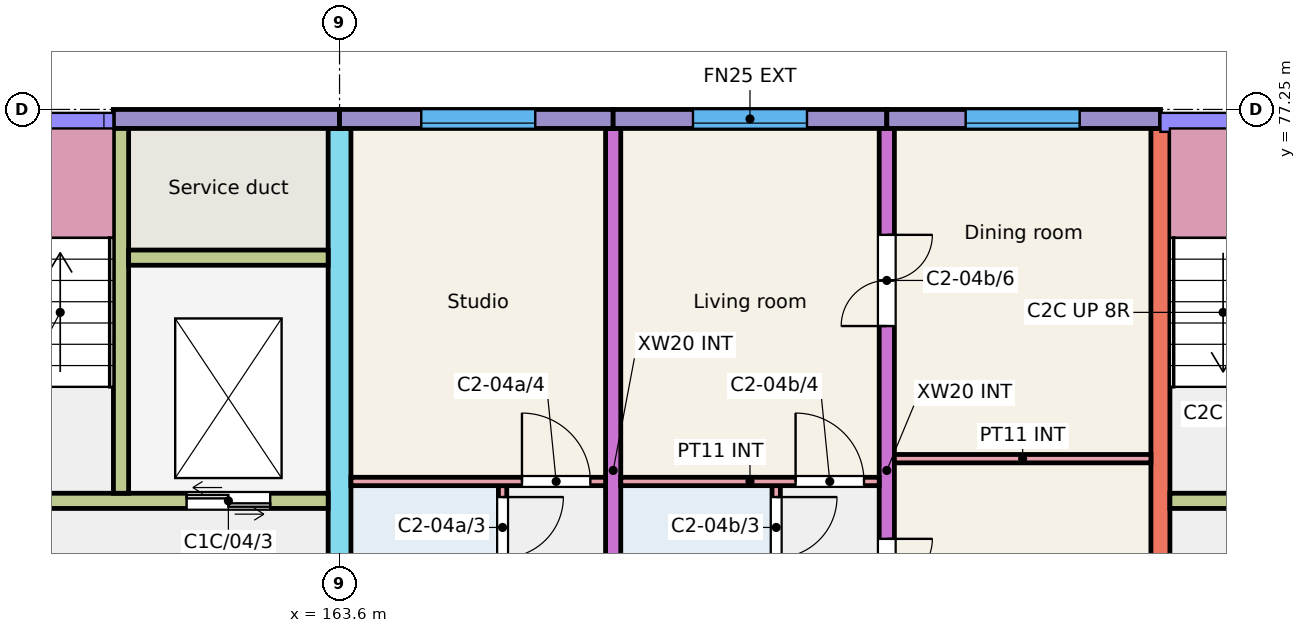
"""IFC4 building model, lengths in metres.
Left out: names, types, materials, properties, quantities, classifications, styles, units other than length and angle.
Written with IfcOpenShell. Run it as: python <this file> out.ifc"""

import sys

from ifc_helpers import new_model, si_unit, direction, frame, frame_2d, origin, place, context, subcontext, project, spatial, rectangle, extrude, element, fill, save


model = new_model("IFC4")
c1 = context("Model", 3, precision=1e-05, world=origin(), true_north=direction((0.0, 1.0)))
c2 = subcontext(c1, "Body", "Model", "MODEL_VIEW")
j1 = project(units=[si_unit("LENGTHUNIT", "METRE"), si_unit("PLANEANGLEUNIT", "RADIAN")], contexts=[c1])
p1 = place(None, origin())
s1 = spatial("IfcSite", under=j1, at=p1, CompositionType="ELEMENT")
p2 = place(p1, origin())
s2 = spatial("IfcBuilding", under=s1, at=p2, CompositionType="ELEMENT")
p3 = place(p2, frame((0.0, 0.0, 12.0)))
s3 = spatial("IfcBuildingStorey", under=s2, at=p3, CompositionType="ELEMENT", Elevation=12.0)
p4 = place(p3, frame((163.6, 66.0, 0.0), z_axis=(0.0, 0.0, 1.0), x_axis=(0.0, 1.0, 0.0)))
e1 = element("IfcWall", 1, at=p4, inside=s3, PredefinedType="SHEAR", context=c2, shape_type="SweptSolid", body=[
    extrude(rectangle(XDim=11.0, YDim=0.3, at=frame_2d((5.5, 0.0))), origin(), (0.0, 0.0, 1.0), 3.0),
])
p5 = place(p4, frame((0.3, 0.0, 0.0)))
e2 = element("IfcOpeningElement", 2, at=p5, cuts=e1, PredefinedType="OPENING", context=c2, shape_type="SweptSolid", body=[
    extrude(rectangle(XDim=1.2, YDim=2.1, at=frame_2d((0.6, 1.05))), frame((0.0, 0.16, 0.0), z_axis=(0.0, -1.0, 0.0), x_axis=(1.0, 0.0, 0.0)), (0.0, 0.0, 1.0), 0.32),
])
p6 = place(p3, frame((167.2, 68.0, 0.0), z_axis=(0.0, 0.0, 1.0), x_axis=(0.0, 1.0, 0.0)))
e3 = element("IfcWall", 3, at=p6, inside=s3, PredefinedType="SHEAR", context=c2, shape_type="SweptSolid", body=[
    extrude(rectangle(XDim=9.0, YDim=0.2, at=frame_2d((4.5, 0.0))), origin(), (0.0, 0.0, 1.0), 3.0),
])
p7 = place(p3, frame((170.8, 68.0, 0.0), z_axis=(0.0, 0.0, 1.0), x_axis=(0.0, 1.0, 0.0)))
e4 = element("IfcWall", 4, at=p7, inside=s3, PredefinedType="SHEAR", context=c2, shape_type="SweptSolid", body=[
    extrude(rectangle(XDim=9.0, YDim=0.2, at=frame_2d((4.5, 0.0))), origin(), (0.0, 0.0, 1.0), 3.0),
])
p8 = place(p7, frame((2.4, 0.0, 0.0)))
e5 = element("IfcOpeningElement", 5, at=p8, cuts=e4, PredefinedType="OPENING", context=c2, shape_type="SweptSolid", body=[
    extrude(rectangle(XDim=1.2, YDim=2.1, at=frame_2d((0.6, 1.05))), frame((0.0, 0.11, 0.0), z_axis=(0.0, -1.0, 0.0), x_axis=(1.0, 0.0, 0.0)), (0.0, 0.0, 1.0), 0.22),
])
p9 = place(p7, frame((6.4, 0.0, 0.0)))
e6 = element("IfcOpeningElement", 6, at=p9, cuts=e4, PredefinedType="OPENING", context=c2, shape_type="SweptSolid", body=[
    extrude(rectangle(XDim=1.2, YDim=2.1, at=frame_2d((0.6, 1.05))), frame((0.0, 0.11, 0.0), z_axis=(0.0, -1.0, 0.0), x_axis=(1.0, 0.0, 0.0)), (0.0, 0.0, 1.0), 0.22),
])
p10 = place(p3, frame((174.4, 68.0, 0.0), z_axis=(0.0, 0.0, 1.0), x_axis=(0.0, 1.0, 0.0)))
e7 = element("IfcWall", 7, at=p10, inside=s3, PredefinedType="SHEAR", context=c2, shape_type="SweptSolid", body=[
    extrude(rectangle(XDim=9.0, YDim=0.25, at=frame_2d((4.5, 0.0))), origin(), (0.0, 0.0, 1.0), 3.0),
])
p11 = place(p3, frame((160.625, 77.125, 0.0), z_axis=(0.0, 0.0, 1.0), x_axis=(1.0, 0.0, 0.0)))
e8 = element("IfcWall", 8, at=p11, inside=s3, PredefinedType="SOLIDWALL", context=c2, shape_type="SweptSolid", body=[
    extrude(rectangle(XDim=2.975, YDim=0.25, at=frame_2d((1.488, 0.0))), origin(), (0.0, 0.0, 1.0), 3.0),
])
p12 = place(p3, frame((157.725, 72.1, 0.0), z_axis=(0.0, 0.0, 1.0), x_axis=(1.0, 0.0, 0.0)))
e9 = element("IfcWall", 9, at=p12, inside=s3, PredefinedType="SHEAR", context=c2, shape_type="SweptSolid", body=[
    extrude(rectangle(XDim=5.725, YDim=0.2, at=frame_2d((2.862, 0.0))), origin(), (0.0, 0.0, 1.0), 3.0),
])
p13 = place(p12, frame((0.95, 0.0, 0.0)))
e10 = element("IfcOpeningElement", 10, at=p13, cuts=e9, PredefinedType="OPENING", context=c2, shape_type="SweptSolid", body=[
    extrude(rectangle(XDim=1.0, YDim=2.1, at=frame_2d((0.5, 1.05))), frame((0.0, 0.11, 0.0), z_axis=(0.0, -1.0, 0.0), x_axis=(1.0, 0.0, 0.0)), (0.0, 0.0, 1.0), 0.22),
])
p14 = place(p12, frame((3.863, 0.0, 0.0)))
e11 = element("IfcOpeningElement", 11, at=p14, cuts=e9, PredefinedType="OPENING", context=c2, shape_type="SweptSolid", body=[
    extrude(rectangle(XDim=1.1, YDim=2.1, at=frame_2d((0.55, 1.05))), frame((0.0, 0.11, 0.0), z_axis=(0.0, -1.0, 0.0), x_axis=(1.0, 0.0, 0.0)), (0.0, 0.0, 1.0), 0.22),
])
p15 = place(p3, frame((160.725, 72.2, 0.0), z_axis=(0.0, 0.0, 1.0), x_axis=(0.0, 1.0, 0.0)))
e12 = element("IfcWall", 12, at=p15, inside=s3, PredefinedType="SHEAR", context=c2, shape_type="SweptSolid", body=[
    extrude(rectangle(XDim=4.8, YDim=0.2, at=frame_2d((2.4, 0.0))), origin(), (0.0, 0.0, 1.0), 3.0),
])
p16 = place(p3, frame((160.825, 75.3, 0.0), z_axis=(0.0, 0.0, 1.0), x_axis=(1.0, 0.0, 0.0)))
e13 = element("IfcWall", 13, at=p16, inside=s3, PredefinedType="SHEAR", context=c2, shape_type="SweptSolid", body=[
    extrude(rectangle(XDim=2.625, YDim=0.2, at=frame_2d((1.312, 0.0))), origin(), (0.0, 0.0, 1.0), 3.0),
])
p17 = place(p3, frame((163.6, 77.125, 0.0), z_axis=(0.0, 0.0, 1.0), x_axis=(1.0, 0.0, 0.0)))
e14 = element("IfcWall", 14, at=p17, inside=s3, PredefinedType="SOLIDWALL", context=c2, shape_type="SweptSolid", body=[
    extrude(rectangle(XDim=3.6, YDim=0.25, at=frame_2d((1.8, 0.0))), origin(), (0.0, 0.0, 1.0), 3.0),
])
p18 = place(p17, frame((1.075, 0.0, 0.9)))
e15 = element("IfcOpeningElement", 15, at=p18, cuts=e14, PredefinedType="OPENING", context=c2, shape_type="SweptSolid", body=[
    extrude(rectangle(XDim=1.5, YDim=1.5, at=frame_2d((0.75, 0.75))), frame((0.0, 0.135, 0.0), z_axis=(0.0, -1.0, 0.0), x_axis=(1.0, 0.0, 0.0)), (0.0, 0.0, 1.0), 0.27),
])
p19 = place(p3, frame((167.2, 77.125, 0.0), z_axis=(0.0, 0.0, 1.0), x_axis=(1.0, 0.0, 0.0)))
e16 = element("IfcWall", 16, at=p19, inside=s3, PredefinedType="SOLIDWALL", context=c2, shape_type="SweptSolid", body=[
    extrude(rectangle(XDim=3.6, YDim=0.25, at=frame_2d((1.8, 0.0))), origin(), (0.0, 0.0, 1.0), 3.0),
])
p20 = place(p19, frame((1.05, 0.0, 0.9)))
e17 = element("IfcOpeningElement", 17, at=p20, cuts=e16, PredefinedType="OPENING", context=c2, shape_type="SweptSolid", body=[
    extrude(rectangle(XDim=1.5, YDim=1.5, at=frame_2d((0.75, 0.75))), frame((0.0, 0.135, 0.0), z_axis=(0.0, -1.0, 0.0), x_axis=(1.0, 0.0, 0.0)), (0.0, 0.0, 1.0), 0.27),
])
p21 = place(p3, frame((170.8, 77.125, 0.0), z_axis=(0.0, 0.0, 1.0), x_axis=(1.0, 0.0, 0.0)))
e18 = element("IfcWall", 18, at=p21, inside=s3, PredefinedType="SOLIDWALL", context=c2, shape_type="SweptSolid", body=[
    extrude(rectangle(XDim=3.6, YDim=0.25, at=frame_2d((1.8, 0.0))), origin(), (0.0, 0.0, 1.0), 3.0),
])
p22 = place(p21, frame((1.038, 0.0, 0.9)))
e19 = element("IfcOpeningElement", 19, at=p22, cuts=e18, PredefinedType="OPENING", context=c2, shape_type="SweptSolid", body=[
    extrude(rectangle(XDim=1.5, YDim=1.5, at=frame_2d((0.75, 0.75))), frame((0.0, 0.135, 0.0), z_axis=(0.0, -1.0, 0.0), x_axis=(1.0, 0.0, 0.0)), (0.0, 0.0, 1.0), 0.27),
])
p23 = place(p3, frame((174.525, 72.1, 0.0), z_axis=(0.0, 0.0, 1.0), x_axis=(1.0, 0.0, 0.0)))
e20 = element("IfcWall", 20, at=p23, inside=s3, PredefinedType="SHEAR", context=c2, shape_type="SweptSolid", body=[
    extrude(rectangle(XDim=5.725, YDim=0.2, at=frame_2d((2.863, 0.0))), origin(), (0.0, 0.0, 1.0), 3.0),
])
p24 = place(p23, frame((0.95, 0.0, 0.0)))
e21 = element("IfcOpeningElement", 21, at=p24, cuts=e20, PredefinedType="OPENING", context=c2, shape_type="SweptSolid", body=[
    extrude(rectangle(XDim=1.0, YDim=2.1, at=frame_2d((0.5, 1.05))), frame((0.0, 0.11, 0.0), z_axis=(0.0, -1.0, 0.0), x_axis=(1.0, 0.0, 0.0)), (0.0, 0.0, 1.0), 0.22),
])
p25 = place(p23, frame((3.863, 0.0, 0.0)))
e22 = element("IfcOpeningElement", 22, at=p25, cuts=e20, PredefinedType="OPENING", context=c2, shape_type="SweptSolid", body=[
    extrude(rectangle(XDim=1.1, YDim=2.1, at=frame_2d((0.55, 1.05))), frame((0.0, 0.11, 0.0), z_axis=(0.0, -1.0, 0.0), x_axis=(1.0, 0.0, 0.0)), (0.0, 0.0, 1.0), 0.22),
])
p26 = place(p3, frame((165.745, 68.0, 0.0), z_axis=(0.0, 0.0, 1.0), x_axis=(0.0, 1.0, 0.0)))
e23 = element("IfcWall", 23, at=p26, inside=s3, PredefinedType="PARTITIONING", context=c2, shape_type="SweptSolid", body=[
    extrude(rectangle(XDim=4.3, YDim=0.11, at=frame_2d((2.15, 0.0))), origin(), (0.0, 0.0, 1.0), 2.8),
])
p27 = place(p26, frame((0.2, 0.0, 0.0)))
e24 = element("IfcOpeningElement", 24, at=p27, cuts=e23, PredefinedType="OPENING", context=c2, shape_type="SweptSolid", body=[
    extrude(rectangle(XDim=0.8, YDim=2.1, at=frame_2d((0.4, 1.05))), frame((0.0, 0.065, 0.0), z_axis=(0.0, -1.0, 0.0), x_axis=(1.0, 0.0, 0.0)), (0.0, 0.0, 1.0), 0.13),
])
p28 = place(p26, frame((3.35, 0.0, 0.0)))
e25 = element("IfcOpeningElement", 25, at=p28, cuts=e23, PredefinedType="OPENING", context=c2, shape_type="SweptSolid", body=[
    extrude(rectangle(XDim=0.8, YDim=2.1, at=frame_2d((0.4, 1.05))), frame((0.0, 0.065, 0.0), z_axis=(0.0, -1.0, 0.0), x_axis=(1.0, 0.0, 0.0)), (0.0, 0.0, 1.0), 0.13),
])
p29 = place(p3, frame((163.75, 72.355, 0.0), z_axis=(0.0, 0.0, 1.0), x_axis=(1.0, 0.0, 0.0)))
e26 = element("IfcWall", 26, at=p29, inside=s3, PredefinedType="PARTITIONING", context=c2, shape_type="SweptSolid", body=[
    extrude(rectangle(XDim=3.35, YDim=0.11, at=frame_2d((1.675, 0.0))), origin(), (0.0, 0.0, 1.0), 2.8),
])
p30 = place(p29, frame((2.25, 0.0, 0.0)))
e27 = element("IfcOpeningElement", 27, at=p30, cuts=e26, PredefinedType="OPENING", context=c2, shape_type="SweptSolid", body=[
    extrude(rectangle(XDim=0.9, YDim=2.1, at=frame_2d((0.45, 1.05))), frame((0.0, 0.065, 0.0), z_axis=(0.0, -1.0, 0.0), x_axis=(1.0, 0.0, 0.0)), (0.0, 0.0, 1.0), 0.13),
])
p31 = place(p3, frame((169.345, 68.0, 0.0), z_axis=(0.0, 0.0, 1.0), x_axis=(0.0, 1.0, 0.0)))
e28 = element("IfcWall", 28, at=p31, inside=s3, PredefinedType="PARTITIONING", context=c2, shape_type="SweptSolid", body=[
    extrude(rectangle(XDim=4.3, YDim=0.11, at=frame_2d((2.15, 0.0))), origin(), (0.0, 0.0, 1.0), 2.8),
])
p32 = place(p31, frame((0.2, 0.0, 0.0)))
e29 = element("IfcOpeningElement", 29, at=p32, cuts=e28, PredefinedType="OPENING", context=c2, shape_type="SweptSolid", body=[
    extrude(rectangle(XDim=0.8, YDim=2.1, at=frame_2d((0.4, 1.05))), frame((0.0, 0.065, 0.0), z_axis=(0.0, -1.0, 0.0), x_axis=(1.0, 0.0, 0.0)), (0.0, 0.0, 1.0), 0.13),
])
p33 = place(p31, frame((3.35, 0.0, 0.0)))
e30 = element("IfcOpeningElement", 30, at=p33, cuts=e28, PredefinedType="OPENING", context=c2, shape_type="SweptSolid", body=[
    extrude(rectangle(XDim=0.8, YDim=2.1, at=frame_2d((0.4, 1.05))), frame((0.0, 0.065, 0.0), z_axis=(0.0, -1.0, 0.0), x_axis=(1.0, 0.0, 0.0)), (0.0, 0.0, 1.0), 0.13),
])
p34 = place(p3, frame((167.3, 72.355, 0.0), z_axis=(0.0, 0.0, 1.0), x_axis=(1.0, 0.0, 0.0)))
e31 = element("IfcWall", 31, at=p34, inside=s3, PredefinedType="PARTITIONING", context=c2, shape_type="SweptSolid", body=[
    extrude(rectangle(XDim=3.4, YDim=0.11, at=frame_2d((1.7, 0.0))), origin(), (0.0, 0.0, 1.0), 2.8),
])
p35 = place(p34, frame((2.3, 0.0, 0.0)))
e32 = element("IfcOpeningElement", 32, at=p35, cuts=e31, PredefinedType="OPENING", context=c2, shape_type="SweptSolid", body=[
    extrude(rectangle(XDim=0.9, YDim=2.1, at=frame_2d((0.45, 1.05))), frame((0.0, 0.065, 0.0), z_axis=(0.0, -1.0, 0.0), x_axis=(1.0, 0.0, 0.0)), (0.0, 0.0, 1.0), 0.13),
])
p36 = place(p3, frame((170.9, 72.655, 0.0), z_axis=(0.0, 0.0, 1.0), x_axis=(1.0, 0.0, 0.0)))
e33 = element("IfcWall", 33, at=p36, inside=s3, PredefinedType="PARTITIONING", context=c2, shape_type="SweptSolid", body=[
    extrude(rectangle(XDim=3.375, YDim=0.11, at=frame_2d((1.688, 0.0))), origin(), (0.0, 0.0, 1.0), 2.8),
])
p37 = place(p18, origin())
e34 = element("IfcWindow", 34, at=p37, inside=s3, PartitioningType="SINGLE_PANEL", PredefinedType="WINDOW", context=c2, shape_type="SweptSolid", body=[
    extrude(rectangle(XDim=1.5, YDim=1.5, at=frame_2d((0.75, 0.75))), frame((0.0, -0.025, 0.0), z_axis=(0.0, -1.0, 0.0), x_axis=(1.0, 0.0, 0.0)), (0.0, 0.0, 1.0), 0.06),
])
fill(e15, e34)
p38 = place(p22, origin())
e35 = element("IfcWindow", 35, at=p38, inside=s3, PartitioningType="SINGLE_PANEL", PredefinedType="WINDOW", context=c2, shape_type="SweptSolid", body=[
    extrude(rectangle(XDim=1.5, YDim=1.5, at=frame_2d((0.75, 0.75))), frame((0.0, -0.025, 0.0), z_axis=(0.0, -1.0, 0.0), x_axis=(1.0, 0.0, 0.0)), (0.0, 0.0, 1.0), 0.06),
])
fill(e19, e35)
p39 = place(p20, origin())
e36 = element("IfcWindow", 36, at=p39, inside=s3, PartitioningType="SINGLE_PANEL", PredefinedType="WINDOW", context=c2, shape_type="SweptSolid", body=[
    extrude(rectangle(XDim=1.5, YDim=1.5, at=frame_2d((0.75, 0.75))), frame((0.0, -0.025, 0.0), z_axis=(0.0, -1.0, 0.0), x_axis=(1.0, 0.0, 0.0)), (0.0, 0.0, 1.0), 0.06),
])
fill(e17, e36)
p40 = place(p28, origin())
e37 = element("IfcDoor", 37, at=p40, inside=s3, OperationType="SINGLE_SWING_RIGHT", PredefinedType="DOOR", context=c2, shape_type="SweptSolid", body=[
    extrude(rectangle(XDim=0.8, YDim=2.1, at=frame_2d((0.4, 1.05))), frame((0.0, 0.025, 0.0), z_axis=(0.0, -1.0, 0.0), x_axis=(1.0, 0.0, 0.0)), (0.0, 0.0, 1.0), 0.05),
])
fill(e25, e37)
p41 = place(p30, origin())
e38 = element("IfcDoor", 38, at=p41, inside=s3, OperationType="SINGLE_SWING_LEFT", PredefinedType="DOOR", context=c2, shape_type="SweptSolid", body=[
    extrude(rectangle(XDim=0.9, YDim=2.1, at=frame_2d((0.45, 1.05))), frame((0.0, 0.025, 0.0), z_axis=(0.0, -1.0, 0.0), x_axis=(1.0, 0.0, 0.0)), (0.0, 0.0, 1.0), 0.05),
])
fill(e27, e38)
p42 = place(p33, origin())
e39 = element("IfcDoor", 39, at=p42, inside=s3, OperationType="SINGLE_SWING_RIGHT", PredefinedType="DOOR", context=c2, shape_type="SweptSolid", body=[
    extrude(rectangle(XDim=0.8, YDim=2.1, at=frame_2d((0.4, 1.05))), frame((0.0, 0.025, 0.0), z_axis=(0.0, -1.0, 0.0), x_axis=(1.0, 0.0, 0.0)), (0.0, 0.0, 1.0), 0.05),
])
fill(e30, e39)
p43 = place(p35, origin())
e40 = element("IfcDoor", 40, at=p43, inside=s3, OperationType="SINGLE_SWING_LEFT", PredefinedType="DOOR", context=c2, shape_type="SweptSolid", body=[
    extrude(rectangle(XDim=0.9, YDim=2.1, at=frame_2d((0.45, 1.05))), frame((0.0, 0.025, 0.0), z_axis=(0.0, -1.0, 0.0), x_axis=(1.0, 0.0, 0.0)), (0.0, 0.0, 1.0), 0.05),
])
fill(e32, e40)
p44 = place(p8, origin())
e41 = element("IfcDoor", 41, at=p44, inside=s3, OperationType="DOUBLE_DOOR_SINGLE_SWING", PredefinedType="DOOR", context=c2, shape_type="SweptSolid", body=[
    extrude(rectangle(XDim=1.2, YDim=2.1, at=frame_2d((0.6, 1.05))), frame((0.0, 0.025, 0.0), z_axis=(0.0, -1.0, 0.0), x_axis=(1.0, 0.0, 0.0)), (0.0, 0.0, 1.0), 0.05),
])
fill(e5, e41)
p45 = place(p9, origin())
e42 = element("IfcDoor", 42, at=p45, inside=s3, OperationType="DOUBLE_DOOR_SINGLE_SWING", PredefinedType="DOOR", context=c2, shape_type="SweptSolid", body=[
    extrude(rectangle(XDim=1.2, YDim=2.1, at=frame_2d((0.6, 1.05))), frame((0.0, 0.025, 0.0), z_axis=(0.0, -1.0, 0.0), x_axis=(1.0, 0.0, 0.0)), (0.0, 0.0, 1.0), 0.05),
])
fill(e6, e42)
p46 = place(p14, origin())
e43 = element("IfcDoor", 43, at=p46, inside=s3, OperationType="DOUBLE_DOOR_SLIDING", PredefinedType="DOOR", context=c2, shape_type="SweptSolid", body=[
    extrude(rectangle(XDim=1.1, YDim=2.1, at=frame_2d((0.55, 1.05))), frame((0.0, 0.025, 0.0), z_axis=(0.0, -1.0, 0.0), x_axis=(1.0, 0.0, 0.0)), (0.0, 0.0, 1.0), 0.05),
])
fill(e11, e43)
save(model, sys.argv[1])
